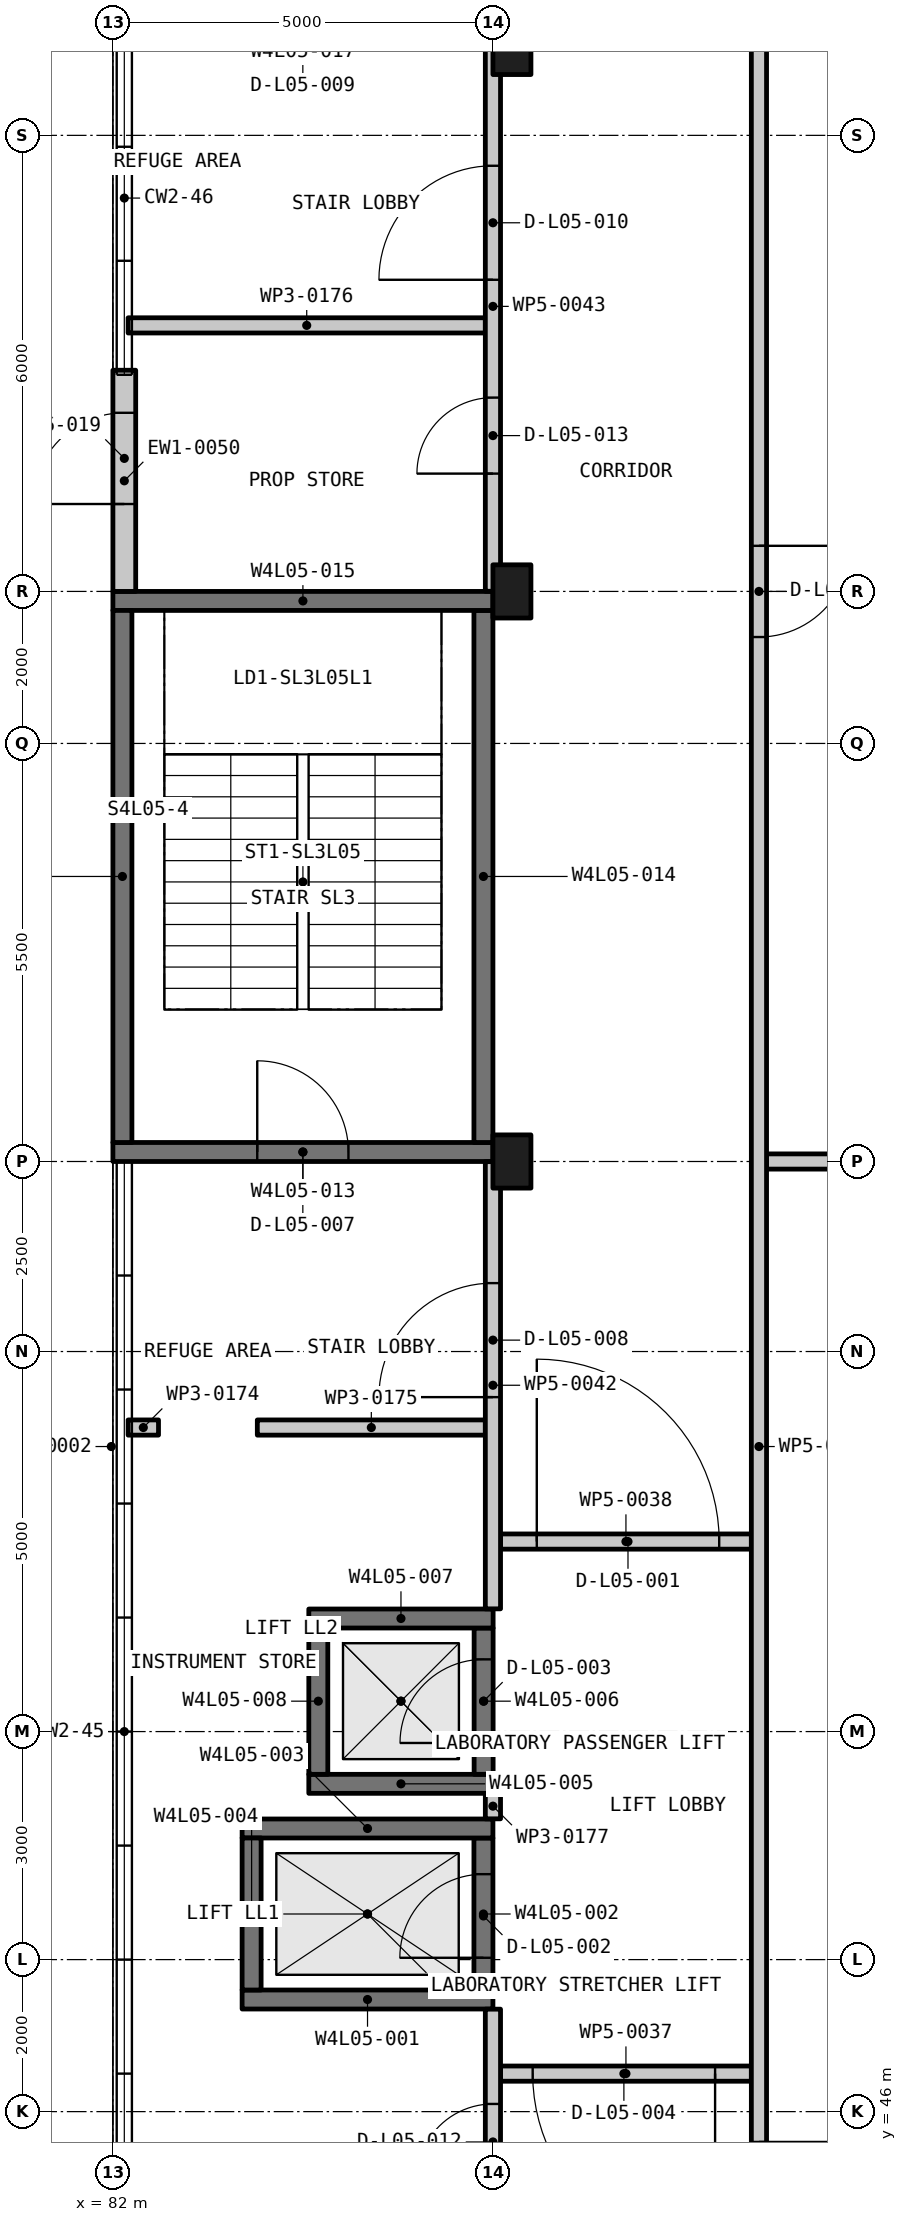
"""IFC4 building model, lengths in metres.
Left out: names, types, materials, properties, quantities, classifications, styles, units other than length and angle.
Written with IfcOpenShell. Run it as: python <this file> out.ifc"""

import sys

from ifc_helpers import new_model, si_unit, direction, frame, frame_2d, origin, origin_2d, place, context, subcontext, project, spatial, rectangle, extrude, element, fill, save


model = new_model("IFC4")
c1 = context("Model", 3, precision=1e-05, world=origin(), true_north=direction((0.0, 1.0)))
c2 = subcontext(c1, "Body", "Model", "MODEL_VIEW")
j1 = project(units=[si_unit("LENGTHUNIT", "METRE"), si_unit("PLANEANGLEUNIT", "RADIAN")], contexts=[c1])
p1 = place(None, origin())
s1 = spatial("IfcSite", under=j1, at=p1, CompositionType="ELEMENT")
p2 = place(p1, origin())
s2 = spatial("IfcBuilding", under=s1, at=p2, CompositionType="ELEMENT")
p3 = place(p2, frame((0.0, 0.0, 24.75)))
s3 = spatial("IfcBuildingStorey", under=s2, at=p3, CompositionType="ELEMENT", Elevation=24.75)
for number, where, z_axis, x_axis in (
    (1, (87.25, 58.5, -0.3), (0.0, 0.0, 1.0), (1.0, 0.0, 0.0)),
    (2, (87.25, 66.0, -0.3), (0.0, 0.0, 1.0), (1.0, 0.0, 0.0)),
    (3, (87.25, 73.15, -0.3), (0.0, 0.0, 1.0), (1.0, 0.0, 0.0)),
):
    element("IfcColumn", number, at=place(p3, frame(where, z_axis=z_axis, x_axis=x_axis)), inside=s3, PredefinedType="COLUMN", context=c2, shape_type="SweptSolid", body=[
        extrude(rectangle(XDim=0.5, YDim=0.7, at=origin_2d()), origin(), (0.0, 0.0, 1.0), 4.5),
    ])
p4 = place(p3, frame((83.7, 47.475, -0.3), z_axis=(0.0, 0.0, 1.0), x_axis=(1.0, 0.0, 0.0)))
e4 = element("IfcWall", 4, at=p4, inside=s3, PredefinedType="SHEAR", context=c2, shape_type="SweptSolid", body=[
    extrude(rectangle(XDim=3.3, YDim=0.25, at=frame_2d((1.65, 0.0))), origin(), (0.0, 0.0, 1.0), 4.5),
])
p5 = place(p3, frame((86.875, 47.6, -0.3), z_axis=(0.0, 0.0, 1.0), x_axis=(0.0, 1.0, 0.0)))
e5 = element("IfcWall", 5, at=p5, inside=s3, PredefinedType="SHEAR", context=c2, shape_type="SweptSolid", body=[
    extrude(rectangle(XDim=2.0, YDim=0.25, at=frame_2d((1.0, 0.0))), origin(), (0.0, 0.0, 1.0), 4.5),
])
p6 = place(p5, frame((0.424, 0.0, 0.3)))
e6 = element("IfcOpeningElement", 6, at=p6, cuts=e5, PredefinedType="OPENING", context=c2, shape_type="SweptSolid", body=[
    extrude(rectangle(XDim=1.1, YDim=2.1, at=frame_2d((0.55, 1.05))), frame((0.0, 0.135, 0.0), z_axis=(0.0, -1.0, 0.0), x_axis=(1.0, 0.0, 0.0)), (0.0, 0.0, 1.0), 0.27),
])
p7 = place(p3, frame((83.7, 49.725, -0.3), z_axis=(0.0, 0.0, 1.0), x_axis=(1.0, 0.0, 0.0)))
e7 = element("IfcWall", 7, at=p7, inside=s3, PredefinedType="SHEAR", context=c2, shape_type="SweptSolid", body=[
    extrude(rectangle(XDim=3.3, YDim=0.25, at=frame_2d((1.65, 0.0))), origin(), (0.0, 0.0, 1.0), 4.5),
])
p8 = place(p3, frame((83.825, 47.6, -0.3), z_axis=(0.0, 0.0, 1.0), x_axis=(0.0, 1.0, 0.0)))
e8 = element("IfcWall", 8, at=p8, inside=s3, PredefinedType="SHEAR", context=c2, shape_type="SweptSolid", body=[
    extrude(rectangle(XDim=2.0, YDim=0.25, at=frame_2d((1.0, 0.0))), origin(), (0.0, 0.0, 1.0), 4.5),
])
p9 = place(p3, frame((84.577, 50.312, -0.3), z_axis=(0.0, 0.0, 1.0), x_axis=(1.0, 0.0, 0.0)))
e9 = element("IfcWall", 9, at=p9, inside=s3, PredefinedType="SHEAR", context=c2, shape_type="SweptSolid", body=[
    extrude(rectangle(XDim=2.425, YDim=0.25, at=frame_2d((1.212, 0.0))), origin(), (0.0, 0.0, 1.0), 4.5),
])
p10 = place(p3, frame((86.877, 50.438, -0.3), z_axis=(0.0, 0.0, 1.0), x_axis=(0.0, 1.0, 0.0)))
e10 = element("IfcWall", 10, at=p10, inside=s3, PredefinedType="SHEAR", context=c2, shape_type="SweptSolid", body=[
    extrude(rectangle(XDim=1.925, YDim=0.25, at=frame_2d((0.962, 0.0))), origin(), (0.0, 0.0, 1.0), 4.5),
])
p11 = place(p10, frame((0.413, 0.0, 0.3)))
e11 = element("IfcOpeningElement", 11, at=p11, cuts=e10, PredefinedType="OPENING", context=c2, shape_type="SweptSolid", body=[
    extrude(rectangle(XDim=1.1, YDim=2.1, at=frame_2d((0.55, 1.05))), frame((0.0, 0.135, 0.0), z_axis=(0.0, -1.0, 0.0), x_axis=(1.0, 0.0, 0.0)), (0.0, 0.0, 1.0), 0.27),
])
p12 = place(p3, frame((84.577, 52.488, -0.3), z_axis=(0.0, 0.0, 1.0), x_axis=(1.0, 0.0, 0.0)))
e12 = element("IfcWall", 12, at=p12, inside=s3, PredefinedType="SHEAR", context=c2, shape_type="SweptSolid", body=[
    extrude(rectangle(XDim=2.425, YDim=0.25, at=frame_2d((1.212, 0.0))), origin(), (0.0, 0.0, 1.0), 4.5),
])
p13 = place(p3, frame((84.702, 50.438, -0.3), z_axis=(0.0, 0.0, 1.0), x_axis=(0.0, 1.0, 0.0)))
e13 = element("IfcWall", 13, at=p13, inside=s3, PredefinedType="SHEAR", context=c2, shape_type="SweptSolid", body=[
    extrude(rectangle(XDim=1.925, YDim=0.25, at=frame_2d((0.962, 0.0))), origin(), (0.0, 0.0, 1.0), 4.5),
])
p14 = place(p3, frame((82.0, 58.625, -0.3), z_axis=(0.0, 0.0, 1.0), x_axis=(1.0, 0.0, 0.0)))
e14 = element("IfcWall", 14, at=p14, inside=s3, PredefinedType="SHEAR", context=c2, shape_type="SweptSolid", body=[
    extrude(rectangle(XDim=5.0, YDim=0.25, at=frame_2d((2.5, 0.0))), origin(), (0.0, 0.0, 1.0), 4.5),
])
p15 = place(p14, frame((1.899, 0.0, 0.3)))
e15 = element("IfcOpeningElement", 15, at=p15, cuts=e14, PredefinedType="OPENING", context=c2, shape_type="SweptSolid", body=[
    extrude(rectangle(XDim=1.2, YDim=2.2, at=frame_2d((0.6, 1.1))), frame((0.0, 0.135, 0.0), z_axis=(0.0, -1.0, 0.0), x_axis=(1.0, 0.0, 0.0)), (0.0, 0.0, 1.0), 0.27),
])
p16 = place(p3, frame((86.875, 58.75, -0.3), z_axis=(0.0, 0.0, 1.0), x_axis=(0.0, 1.0, 0.0)))
e16 = element("IfcWall", 16, at=p16, inside=s3, PredefinedType="SHEAR", context=c2, shape_type="SweptSolid", body=[
    extrude(rectangle(XDim=7.0, YDim=0.25, at=frame_2d((3.5, 0.0))), origin(), (0.0, 0.0, 1.0), 4.5),
])
p17 = place(p3, frame((82.0, 65.875, -0.3), z_axis=(0.0, 0.0, 1.0), x_axis=(1.0, 0.0, 0.0)))
e17 = element("IfcWall", 17, at=p17, inside=s3, PredefinedType="SHEAR", context=c2, shape_type="SweptSolid", body=[
    extrude(rectangle(XDim=5.0, YDim=0.25, at=frame_2d((2.5, 0.0))), origin(), (0.0, 0.0, 1.0), 4.5),
])
p18 = place(p3, frame((82.125, 58.75, -0.3), z_axis=(0.0, 0.0, 1.0), x_axis=(0.0, 1.0, 0.0)))
e18 = element("IfcWall", 18, at=p18, inside=s3, PredefinedType="SHEAR", context=c2, shape_type="SweptSolid", body=[
    extrude(rectangle(XDim=7.0, YDim=0.25, at=frame_2d((3.5, 0.0))), origin(), (0.0, 0.0, 1.0), 4.5),
])
p19 = place(p3, frame((82.15, 66.0, 0.0), z_axis=(0.0, 0.0, 1.0), x_axis=(0.0, 1.0, 0.0)))
e19 = element("IfcWall", 19, at=p19, inside=s3, PredefinedType="SOLIDWALL", context=c2, shape_type="SweptSolid", body=[
    extrude(rectangle(XDim=2.91, YDim=0.3, at=frame_2d((1.455, 0.0))), origin(), (0.0, 0.0, 1.0), 4.2),
])
p20 = place(p19, frame((1.15, 0.0, 0.0)))
e20 = element("IfcOpeningElement", 20, at=p20, cuts=e19, PredefinedType="OPENING", context=c2, shape_type="SweptSolid", body=[
    extrude(rectangle(XDim=1.2, YDim=2.2, at=frame_2d((0.6, 1.1))), frame((0.0, 0.16, 0.0), z_axis=(0.0, -1.0, 0.0), x_axis=(1.0, 0.0, 0.0)), (0.0, 0.0, 1.0), 0.32),
])
p21 = place(p3, frame((90.4, 46.5, 0.0), z_axis=(0.0, 0.0, 1.0), x_axis=(-1.0, 0.0, 0.0)))
e21 = element("IfcWall", 21, at=p21, inside=s3, PredefinedType="PARTITIONING", context=c2, shape_type="SweptSolid", body=[
    extrude(rectangle(XDim=3.3, YDim=0.2, at=frame_2d((1.65, 0.0))), origin(), (0.0, 0.0, 1.0), 3.4),
])
p22 = place(p21, frame((0.477, 0.0, 0.0)))
e22 = element("IfcOpeningElement", 22, at=p22, cuts=e21, PredefinedType="OPENING", context=c2, shape_type="SweptSolid", body=[
    extrude(rectangle(XDim=2.4, YDim=2.1, at=frame_2d((1.2, 1.05))), frame((0.0, 0.11, 0.0), z_axis=(0.0, -1.0, 0.0), x_axis=(1.0, 0.0, 0.0)), (0.0, 0.0, 1.0), 0.22),
])
p23 = place(p3, frame((87.1, 53.5, 0.0), z_axis=(0.0, 0.0, 1.0), x_axis=(1.0, 0.0, 0.0)))
e23 = element("IfcWall", 23, at=p23, inside=s3, PredefinedType="PARTITIONING", context=c2, shape_type="SweptSolid", body=[
    extrude(rectangle(XDim=3.3, YDim=0.2, at=frame_2d((1.65, 0.0))), origin(), (0.0, 0.0, 1.0), 3.4),
])
p24 = place(p23, frame((0.477, 0.0, 0.0)))
e24 = element("IfcOpeningElement", 24, at=p24, cuts=e23, PredefinedType="OPENING", context=c2, shape_type="SweptSolid", body=[
    extrude(rectangle(XDim=2.4, YDim=2.1, at=frame_2d((1.2, 1.05))), frame((0.0, 0.11, 0.0), z_axis=(0.0, -1.0, 0.0), x_axis=(1.0, 0.0, 0.0)), (0.0, 0.0, 1.0), 0.22),
])
p25 = place(p3, frame((82.2, 55.0, 0.0), z_axis=(0.0, 0.0, 1.0), x_axis=(1.0, 0.0, 0.0)))
e25 = element("IfcWall", 25, at=p25, inside=s3, PredefinedType="PARTITIONING", context=c2, shape_type="SweptSolid", body=[
    extrude(rectangle(XDim=0.4, YDim=0.2, at=frame_2d((0.2, 0.0))), origin(), (0.0, 0.0, 1.0), 4.2),
])
p26 = place(p3, frame((83.9, 55.0, 0.0), z_axis=(0.0, 0.0, 1.0), x_axis=(1.0, 0.0, 0.0)))
e26 = element("IfcWall", 26, at=p26, inside=s3, PredefinedType="PARTITIONING", context=c2, shape_type="SweptSolid", body=[
    extrude(rectangle(XDim=3.0, YDim=0.2, at=frame_2d((1.5, 0.0))), origin(), (0.0, 0.0, 1.0), 3.5),
])
p27 = place(p3, frame((90.6, 58.5, 0.0), z_axis=(0.0, 0.0, 1.0), x_axis=(1.0, 0.0, 0.0)))
e27 = element("IfcWall", 27, at=p27, inside=s3, PredefinedType="PARTITIONING", context=c2, shape_type="SweptSolid", body=[
    extrude(rectangle(XDim=13.2, YDim=0.2, at=frame_2d((6.6, 0.0))), origin(), (0.0, 0.0, 1.0), 3.3),
])
p28 = place(p3, frame((82.2, 69.5, 0.0), z_axis=(0.0, 0.0, 1.0), x_axis=(1.0, 0.0, 0.0)))
e28 = element("IfcWall", 28, at=p28, inside=s3, PredefinedType="PARTITIONING", context=c2, shape_type="SweptSolid", body=[
    extrude(rectangle(XDim=4.7, YDim=0.2, at=frame_2d((2.35, 0.0))), origin(), (0.0, 0.0, 1.0), 3.5),
])
p29 = place(p3, frame((90.5, 80.8, 0.0), z_axis=(0.0, 0.0, 1.0), x_axis=(0.0, -1.0, 0.0)))
e29 = element("IfcWall", 29, at=p29, inside=s3, PredefinedType="PARTITIONING", context=c2, shape_type="SweptSolid", body=[
    extrude(rectangle(XDim=52.1, YDim=0.2, at=frame_2d((26.05, 0.0))), origin(), (0.0, 0.0, 1.0), 3.3),
])
p30 = place(p29, frame((44.1, 0.0, 0.0)))
e30 = element("IfcOpeningElement", 30, at=p30, cuts=e29, PredefinedType="OPENING", context=c2, shape_type="SweptSolid", body=[
    extrude(rectangle(XDim=1.2, YDim=2.1, at=frame_2d((0.6, 1.05))), frame((0.0, 0.11, 0.0), z_axis=(0.0, -1.0, 0.0), x_axis=(1.0, 0.0, 0.0)), (0.0, 0.0, 1.0), 0.22),
])
p31 = place(p29, frame((35.199, 0.0, 0.0)))
e31 = element("IfcOpeningElement", 31, at=p31, cuts=e29, PredefinedType="OPENING", context=c2, shape_type="SweptSolid", body=[
    extrude(rectangle(XDim=1.2, YDim=2.1, at=frame_2d((0.6, 1.05))), frame((0.0, 0.11, 0.0), z_axis=(0.0, -1.0, 0.0), x_axis=(1.0, 0.0, 0.0)), (0.0, 0.0, 1.0), 0.22),
])
p32 = place(p29, frame((14.2, 0.0, 0.0)))
e32 = element("IfcOpeningElement", 32, at=p32, cuts=e29, PredefinedType="OPENING", context=c2, shape_type="SweptSolid", body=[
    extrude(rectangle(XDim=1.2, YDim=2.1, at=frame_2d((0.6, 1.05))), frame((0.0, 0.11, 0.0), z_axis=(0.0, -1.0, 0.0), x_axis=(1.0, 0.0, 0.0)), (0.0, 0.0, 1.0), 0.22),
])
p33 = place(p29, frame((3.075, 0.0, 0.0)))
e33 = element("IfcOpeningElement", 33, at=p33, cuts=e29, PredefinedType="OPENING", context=c2, shape_type="SweptSolid", body=[
    extrude(rectangle(XDim=1.2, YDim=2.1, at=frame_2d((0.6, 1.05))), frame((0.0, 0.11, 0.0), z_axis=(0.0, -1.0, 0.0), x_axis=(1.0, 0.0, 0.0)), (0.0, 0.0, 1.0), 0.22),
])
p34 = place(p3, frame((87.0, 43.502, 0.0), z_axis=(0.0, 0.0, 1.0), x_axis=(0.0, 1.0, 0.0)))
e34 = element("IfcWall", 34, at=p34, inside=s3, PredefinedType="PARTITIONING", context=c2, shape_type="SweptSolid", body=[
    extrude(rectangle(XDim=3.846, YDim=0.2, at=frame_2d((1.923, 0.0))), origin(), (0.0, 0.0, 1.0), 3.4),
])
p35 = place(p34, frame((1.599, 0.0, 0.0)))
e35 = element("IfcOpeningElement", 35, at=p35, cuts=e34, PredefinedType="OPENING", context=c2, shape_type="SweptSolid", body=[
    extrude(rectangle(XDim=1.0, YDim=2.1, at=frame_2d((0.5, 1.05))), frame((0.0, 0.11, 0.0), z_axis=(0.0, -1.0, 0.0), x_axis=(1.0, 0.0, 0.0)), (0.0, 0.0, 1.0), 0.22),
])
p36 = place(p3, frame((87.0, 49.852, 0.0), z_axis=(0.0, 0.0, 1.0), x_axis=(0.0, 1.0, 0.0)))
e36 = element("IfcWall", 36, at=p36, inside=s3, PredefinedType="PARTITIONING", context=c2, shape_type="SweptSolid", body=[
    extrude(rectangle(XDim=0.333, YDim=0.2, at=frame_2d((0.167, 0.0))), origin(), (0.0, 0.0, 1.0), 3.4),
])
p37 = place(p3, frame((87.0, 52.615, 0.0), z_axis=(0.0, 0.0, 1.0), x_axis=(0.0, 1.0, 0.0)))
e37 = element("IfcWall", 37, at=p37, inside=s3, PredefinedType="PARTITIONING", context=c2, shape_type="SweptSolid", body=[
    extrude(rectangle(XDim=5.884, YDim=0.2, at=frame_2d((2.942, 0.0))), origin(), (0.0, 0.0, 1.0), 3.4),
])
p38 = place(p37, frame((2.785, 0.0, 0.0)))
e38 = element("IfcOpeningElement", 38, at=p38, cuts=e37, PredefinedType="OPENING", context=c2, shape_type="SweptSolid", body=[
    extrude(rectangle(XDim=1.5, YDim=2.1, at=frame_2d((0.75, 1.05))), frame((0.0, 0.11, 0.0), z_axis=(0.0, -1.0, 0.0), x_axis=(1.0, 0.0, 0.0)), (0.0, 0.0, 1.0), 0.22),
])
p39 = place(p3, frame((87.0, 66.002, 0.0), z_axis=(0.0, 0.0, 1.0), x_axis=(0.0, 1.0, 0.0)))
e39 = element("IfcWall", 39, at=p39, inside=s3, PredefinedType="PARTITIONING", context=c2, shape_type="SweptSolid", body=[
    extrude(rectangle(XDim=7.496, YDim=0.2, at=frame_2d((3.748, 0.0))), origin(), (0.0, 0.0, 1.0), 3.4),
])
p40 = place(p39, frame((4.098, 0.0, 0.0)))
e40 = element("IfcOpeningElement", 40, at=p40, cuts=e39, PredefinedType="OPENING", context=c2, shape_type="SweptSolid", body=[
    extrude(rectangle(XDim=1.5, YDim=2.1, at=frame_2d((0.75, 1.05))), frame((0.0, 0.11, 0.0), z_axis=(0.0, -1.0, 0.0), x_axis=(1.0, 0.0, 0.0)), (0.0, 0.0, 1.0), 0.22),
])
p41 = place(p39, frame((1.548, 0.0, 0.0)))
e41 = element("IfcOpeningElement", 41, at=p41, cuts=e39, PredefinedType="OPENING", context=c2, shape_type="SweptSolid", body=[
    extrude(rectangle(XDim=1.0, YDim=2.1, at=frame_2d((0.5, 1.05))), frame((0.0, 0.11, 0.0), z_axis=(0.0, -1.0, 0.0), x_axis=(1.0, 0.0, 0.0)), (0.0, 0.0, 1.0), 0.22),
])
p42 = place(p20, origin())
e42 = element("IfcDoor", 42, at=p42, inside=s3, OperationType="SINGLE_SWING_RIGHT", PredefinedType="DOOR", context=c2, shape_type="SweptSolid", body=[
    extrude(rectangle(XDim=1.2, YDim=2.2, at=frame_2d((0.6, 1.1))), frame((0.0, 0.025, 0.0), z_axis=(0.0, -1.0, 0.0), x_axis=(1.0, 0.0, 0.0)), (0.0, 0.0, 1.0), 0.05),
])
fill(e20, e42)
p43 = place(p24, origin())
e43 = element("IfcDoor", 43, at=p43, inside=s3, OperationType="DOUBLE_DOOR_SINGLE_SWING", PredefinedType="DOOR", context=c2, shape_type="SweptSolid", body=[
    extrude(rectangle(XDim=2.4, YDim=2.1, at=frame_2d((1.2, 1.05))), frame((0.0, 0.025, 0.0), z_axis=(0.0, -1.0, 0.0), x_axis=(1.0, 0.0, 0.0)), (0.0, 0.0, 1.0), 0.05),
])
fill(e24, e43)
p44 = place(p6, origin())
e44 = element("IfcDoor", 44, at=p44, inside=s3, OperationType="DOUBLE_DOOR_SLIDING", PredefinedType="DOOR", context=c2, shape_type="SweptSolid", body=[
    extrude(rectangle(XDim=1.1, YDim=2.1, at=frame_2d((0.55, 1.05))), frame((0.0, 0.025, 0.0), z_axis=(0.0, -1.0, 0.0), x_axis=(1.0, 0.0, 0.0)), (0.0, 0.0, 1.0), 0.05),
])
fill(e6, e44)
p45 = place(p11, origin())
e45 = element("IfcDoor", 45, at=p45, inside=s3, OperationType="DOUBLE_DOOR_SLIDING", PredefinedType="DOOR", context=c2, shape_type="SweptSolid", body=[
    extrude(rectangle(XDim=1.1, YDim=2.1, at=frame_2d((0.55, 1.05))), frame((0.0, 0.025, 0.0), z_axis=(0.0, -1.0, 0.0), x_axis=(1.0, 0.0, 0.0)), (0.0, 0.0, 1.0), 0.05),
])
fill(e11, e45)
p46 = place(p22, origin())
e46 = element("IfcDoor", 46, at=p46, inside=s3, OperationType="DOUBLE_DOOR_SINGLE_SWING", PredefinedType="DOOR", context=c2, shape_type="SweptSolid", body=[
    extrude(rectangle(XDim=2.4, YDim=2.1, at=frame_2d((1.2, 1.05))), frame((0.0, 0.025, 0.0), z_axis=(0.0, -1.0, 0.0), x_axis=(1.0, 0.0, 0.0)), (0.0, 0.0, 1.0), 0.05),
])
fill(e22, e46)
p47 = place(p15, origin())
e47 = element("IfcDoor", 47, at=p47, inside=s3, OperationType="SINGLE_SWING_RIGHT", PredefinedType="DOOR", context=c2, shape_type="SweptSolid", body=[
    extrude(rectangle(XDim=1.2, YDim=2.2, at=frame_2d((0.6, 1.1))), frame((0.0, 0.025, 0.0), z_axis=(0.0, -1.0, 0.0), x_axis=(1.0, 0.0, 0.0)), (0.0, 0.0, 1.0), 0.05),
])
fill(e15, e47)
p48 = place(p38, origin())
e48 = element("IfcDoor", 48, at=p48, inside=s3, OperationType="DOUBLE_DOOR_SINGLE_SWING", PredefinedType="DOOR", context=c2, shape_type="SweptSolid", body=[
    extrude(rectangle(XDim=1.5, YDim=2.1, at=frame_2d((0.75, 1.05))), frame((0.0, 0.025, 0.0), z_axis=(0.0, -1.0, 0.0), x_axis=(1.0, 0.0, 0.0)), (0.0, 0.0, 1.0), 0.05),
])
fill(e38, e48)
p49 = place(p40, origin())
e49 = element("IfcDoor", 49, at=p49, inside=s3, OperationType="DOUBLE_DOOR_SINGLE_SWING", PredefinedType="DOOR", context=c2, shape_type="SweptSolid", body=[
    extrude(rectangle(XDim=1.5, YDim=2.1, at=frame_2d((0.75, 1.05))), frame((0.0, 0.025, 0.0), z_axis=(0.0, -1.0, 0.0), x_axis=(1.0, 0.0, 0.0)), (0.0, 0.0, 1.0), 0.05),
])
fill(e40, e49)
p50 = place(p35, origin())
e50 = element("IfcDoor", 50, at=p50, inside=s3, OperationType="SINGLE_SWING_LEFT", PredefinedType="DOOR", context=c2, shape_type="SweptSolid", body=[
    extrude(rectangle(XDim=1.0, YDim=2.1, at=frame_2d((0.5, 1.05))), frame((0.0, 0.025, 0.0), z_axis=(0.0, -1.0, 0.0), x_axis=(1.0, 0.0, 0.0)), (0.0, 0.0, 1.0), 0.05),
])
fill(e35, e50)
p51 = place(p41, origin())
e51 = element("IfcDoor", 51, at=p51, inside=s3, OperationType="SINGLE_SWING_RIGHT", PredefinedType="DOOR", context=c2, shape_type="SweptSolid", body=[
    extrude(rectangle(XDim=1.0, YDim=2.1, at=frame_2d((0.5, 1.05))), frame((0.0, 0.025, 0.0), z_axis=(0.0, -1.0, 0.0), x_axis=(1.0, 0.0, 0.0)), (0.0, 0.0, 1.0), 0.05),
])
fill(e41, e51)
p52 = place(p31, origin())
e52 = element("IfcDoor", 52, at=p52, inside=s3, OperationType="SINGLE_SWING_LEFT", PredefinedType="DOOR", context=c2, shape_type="SweptSolid", body=[
    extrude(rectangle(XDim=1.2, YDim=2.1, at=frame_2d((0.6, 1.05))), frame((0.0, 0.025, 0.0), z_axis=(0.0, -1.0, 0.0), x_axis=(1.0, 0.0, 0.0)), (0.0, 0.0, 1.0), 0.05),
])
fill(e31, e52)
p53 = place(p32, origin())
e53 = element("IfcDoor", 53, at=p53, inside=s3, OperationType="SINGLE_SWING_RIGHT", PredefinedType="DOOR", context=c2, shape_type="SweptSolid", body=[
    extrude(rectangle(XDim=1.2, YDim=2.1, at=frame_2d((0.6, 1.05))), frame((0.0, 0.025, 0.0), z_axis=(0.0, -1.0, 0.0), x_axis=(1.0, 0.0, 0.0)), (0.0, 0.0, 1.0), 0.05),
])
fill(e32, e53)
save(model, sys.argv[1])
